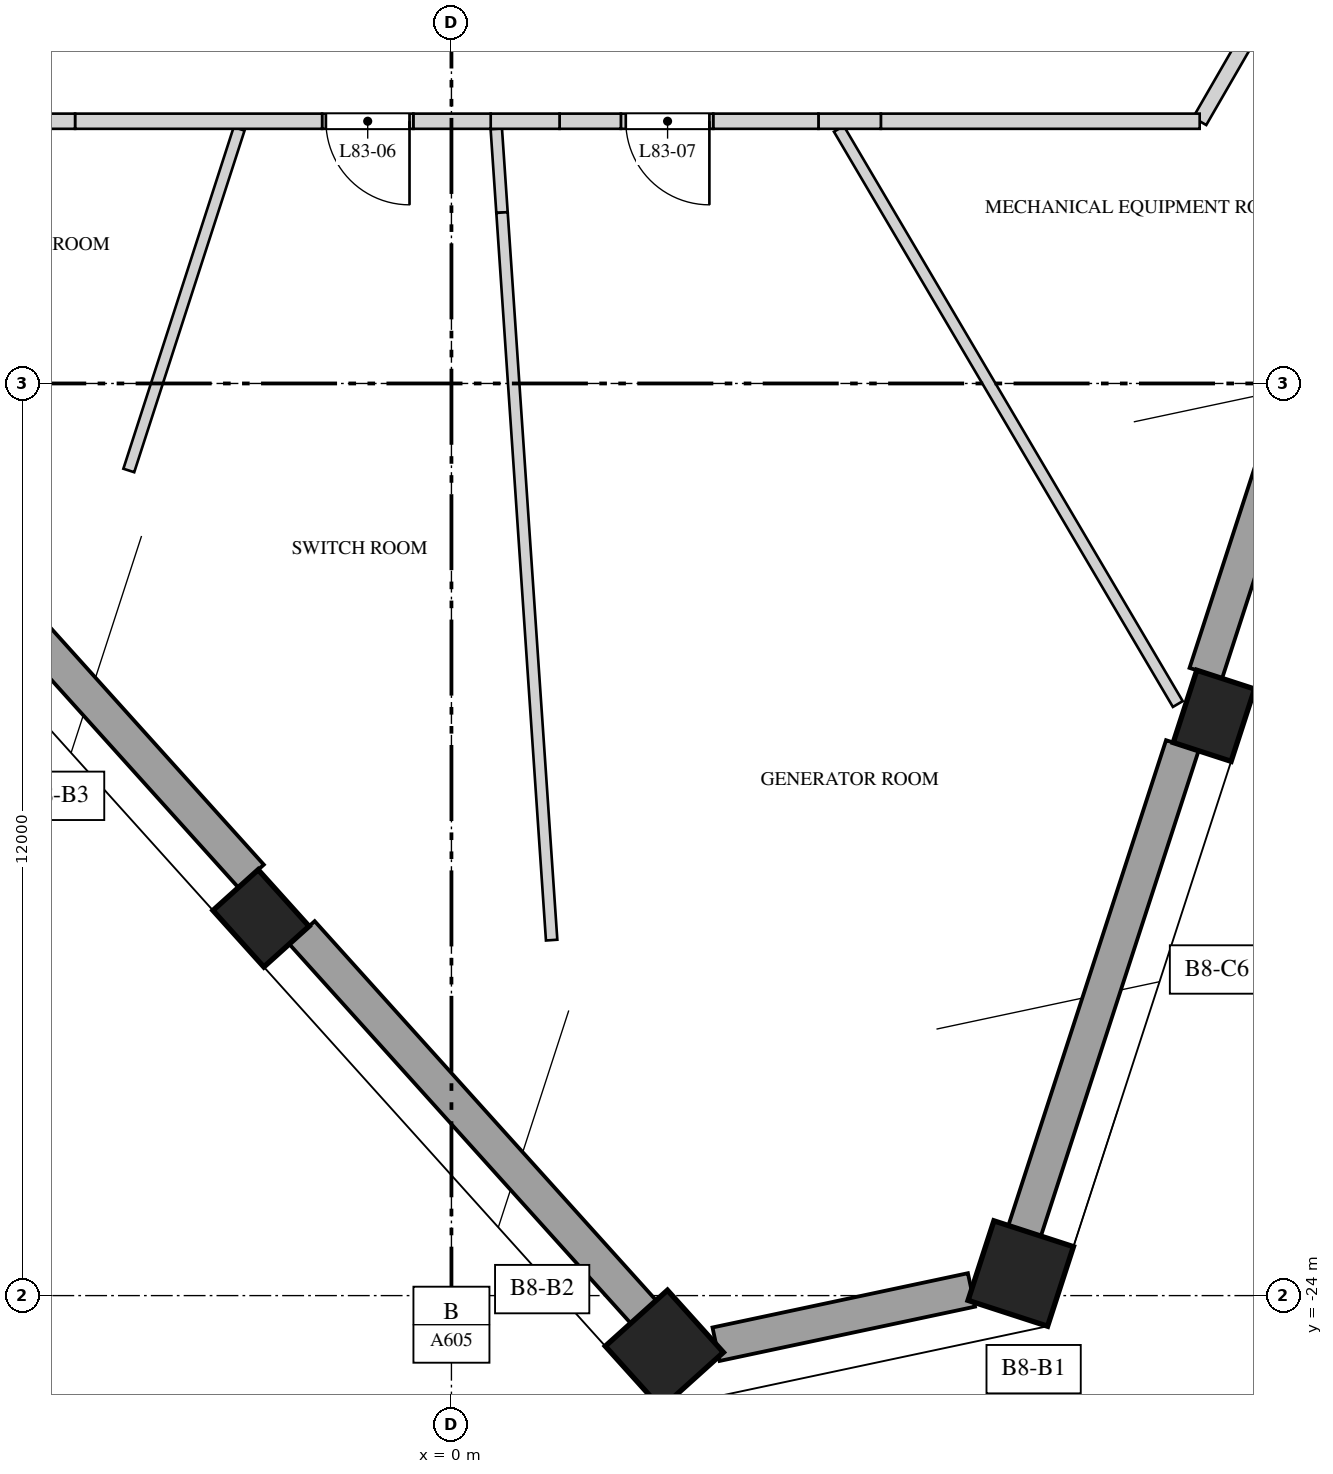
"""IFC4 building model, lengths in metres.
Left out: names, types, materials, properties, quantities, classifications, styles, units other than length and angle.
Written with IfcOpenShell. Run it as: python <this file> out.ifc"""

import sys

from ifc_helpers import new_model, si_unit, direction, frame, frame_2d, origin, origin_2d, place, context, subcontext, project, spatial, polyline, rectangle, outline, extrude, element, fill, save


model = new_model("IFC4")
c1 = context("Model", 3, precision=1e-05, world=origin(), true_north=direction((0.0, 1.0)))
c2 = subcontext(c1, "Body", "Model", "MODEL_VIEW")
j1 = project(units=[si_unit("LENGTHUNIT", "METRE"), si_unit("PLANEANGLEUNIT", "RADIAN")], contexts=[c1])
p1 = place(None, origin())
s1 = spatial("IfcSite", under=j1, at=p1, CompositionType="ELEMENT")
p2 = place(p1, origin())
s2 = spatial("IfcBuilding", under=s1, at=p2, CompositionType="ELEMENT")
p3 = place(p2, frame((0.0, 0.0, 361.4)))
s3 = spatial("IfcBuildingStorey", under=s2, at=p3, CompositionType="ELEMENT", Elevation=361.4)
p4 = place(p3, frame((-2.505, -19.037, 0.0), z_axis=(0.0, 0.0, 1.0), x_axis=(0.669130606359, -0.743144825477, 0.0)))
e1 = element("IfcColumn", 1, at=p4, inside=s3, PredefinedType="COLUMN", context=c2, shape_type="SweptSolid", body=[
    extrude(rectangle(XDim=1.0, YDim=0.8, at=origin_2d()), origin(), (0.0, 0.0, 1.0), 4.5),
])
for number, where, z_axis, x_axis in (
    (2, (2.801, -24.706, 0.0), (0.0, 0.0, 1.0), (0.669, -0.743, 0.0)),
    (3, (7.49, -23.709, 0.0), (0.0, 0.0, 1.0), (0.309, 0.951, 0.0)),
):
    element("IfcColumn", number, at=place(p3, frame(where, z_axis=z_axis, x_axis=x_axis)), inside=s3, PredefinedType="COLUMN", context=c2, shape_type="SweptSolid", body=[
        extrude(rectangle(XDim=1.1, YDim=1.1, at=origin_2d()), origin(), (0.0, 0.0, 1.0), 4.5),
    ])
p5 = place(p3, frame((10.032, -16.372, 0.0), z_axis=(0.0, 0.0, 1.0), x_axis=(0.309016994375, 0.951056516295, 0.0)))
e4 = element("IfcColumn", 4, at=p5, inside=s3, PredefinedType="COLUMN", context=c2, shape_type="SweptSolid", body=[
    extrude(rectangle(XDim=1.0, YDim=0.8, at=origin_2d()), origin(), (0.0, 0.0, 1.0), 4.5),
])
p6 = place(p3, frame((-7.53, -13.046, 0.0), z_axis=(0.0, 0.0, 1.0), x_axis=(0.669152823362, -0.743124820597, 0.0)))
e5 = element("IfcWall", 5, at=p6, inside=s3, PredefinedType="SOLIDWALL", context=c2, shape_type="SweptSolid", body=[
    extrude(rectangle(XDim=7.314, YDim=0.45, at=frame_2d((3.657, 0.0))), origin(), (0.0, 0.0, 1.0), 3.8),
])
p7 = place(p3, frame((-1.966, -19.224, 0.0), z_axis=(0.0, 0.0, 1.0), x_axis=(0.66911941145, -0.743154905266, 0.0)))
e6 = element("IfcWall", 6, at=p7, inside=s3, PredefinedType="SOLIDWALL", context=c2, shape_type="SweptSolid", body=[
    extrude(rectangle(XDim=6.714, YDim=0.45, at=frame_2d((3.357, 0.0))), origin(), (0.0, 0.0, 1.0), 3.8),
])
p8 = place(p3, frame((3.481, -24.64, 0.0), z_axis=(0.0, 0.0, 1.0), x_axis=(0.978139158523, 0.207951404333, 0.0)))
e7 = element("IfcWall", 7, at=p8, inside=s3, PredefinedType="SOLIDWALL", context=c2, shape_type="SweptSolid", body=[
    extrude(rectangle(XDim=3.435, YDim=0.45, at=frame_2d((1.718, 0.0))), origin(), (0.0, 0.0, 1.0), 3.8),
])
p9 = place(p3, frame((7.541, -23.148, 0.0), z_axis=(0.0, 0.0, 1.0), x_axis=(0.309018647645, 0.951055979114, 0.0)))
e8 = element("IfcWall", 8, at=p9, inside=s3, PredefinedType="SOLIDWALL", context=c2, shape_type="SweptSolid", body=[
    extrude(rectangle(XDim=6.714, YDim=0.45, at=frame_2d((3.357, 0.0))), origin(), (0.0, 0.0, 1.0), 3.8),
])
p10 = place(p3, frame((9.925, -15.812, 0.0), z_axis=(0.0, 0.0, 1.0), x_axis=(0.309008326872, 0.951059332494, 0.0)))
e9 = element("IfcWall", 9, at=p10, inside=s3, PredefinedType="SOLIDWALL", context=c2, shape_type="SweptSolid", body=[
    extrude(rectangle(XDim=7.314, YDim=0.45, at=frame_2d((3.657, 0.0))), origin(), (0.0, 0.0, 1.0), 3.8),
])
p11 = place(p3, frame((-2.793, -8.65, 0.0), z_axis=(0.0, 0.0, 1.0), x_axis=(-0.307297266893, -0.951613571656, 0.0)))
e10 = element("IfcWall", 10, at=p11, inside=s3, PredefinedType="PARTITIONING", context=c2, shape_type="SweptSolid", body=[
    extrude(rectangle(XDim=4.723, YDim=0.15, at=frame_2d((2.362, 0.0))), origin(), (0.0, 0.0, 1.0), 4.15),
])
p12 = place(p3, frame((0.59, -8.65, 0.0), z_axis=(0.0, 0.0, 1.0), x_axis=(0.068118949161, -0.997677206698, 0.0)))
e11 = element("IfcWall", 11, at=p12, inside=s3, PredefinedType="PARTITIONING", context=c2, shape_type="SweptSolid", body=[
    extrude(rectangle(XDim=1.104, YDim=0.15, at=frame_2d((0.552, 0.0))), origin(), (0.0, 0.0, 1.0), 3.05),
])
p13 = place(p3, frame((0.665, -9.751, 0.0), z_axis=(0.0, 0.0, 1.0), x_axis=(0.068072821069, -0.99768035514, 0.0)))
e12 = element("IfcWall", 12, at=p13, inside=s3, PredefinedType="PARTITIONING", context=c2, shape_type="SweptSolid", body=[
    extrude(rectangle(XDim=9.594, YDim=0.15, at=frame_2d((4.797, 0.0))), origin(), (0.0, 0.0, 1.0), 4.15),
])
p14 = place(p3, frame((5.097, -8.65, 0.0), z_axis=(0.0, 0.0, 1.0), x_axis=(0.507661360347, -0.861556697618, 0.0)))
e13 = element("IfcWall", 13, at=p14, inside=s3, PredefinedType="PARTITIONING", context=c2, shape_type="SweptSolid", body=[
    extrude(rectangle(XDim=8.783, YDim=0.15, at=frame_2d((4.392, 0.0))), origin(), (0.0, 0.0, 1.0), 3.45),
])
p15 = place(p3, frame((10.474, -7.458, 0.0), z_axis=(0.0, 0.0, 1.0), x_axis=(-0.499929168788, -0.866066294342, 0.0)))
e14 = element("IfcWall", 14, at=p15, inside=s3, PredefinedType="SOLIDWALL", context=c2, shape_type="SweptSolid", body=[
    extrude(rectangle(XDim=1.261, YDim=0.2, at=frame_2d((0.63, 0.0))), origin(), (0.0, 0.0, 1.0), 4.15),
])
p16 = place(p3, frame((9.844, -8.55, 0.0), z_axis=(0.0, 0.0, 1.0), x_axis=(-1.0, 0.0, 0.0)))
e15 = element("IfcWall", 15, at=p16, inside=s3, PredefinedType="SOLIDWALL", context=c2, shape_type="SweptSolid", body=[
    extrude(rectangle(XDim=4.194, YDim=0.2, at=frame_2d((2.097, 0.0))), origin(), (0.0, 0.0, 1.0), 4.15),
])
p17 = place(p3, frame((5.649, -8.55, 0.0), z_axis=(0.0, 0.0, 1.0), x_axis=(-1.0, 0.0, 0.0)))
e16 = element("IfcWall", 16, at=p17, inside=s3, PredefinedType="SOLIDWALL", context=c2, shape_type="SweptSolid", body=[
    extrude(rectangle(XDim=0.821, YDim=0.2, at=frame_2d((0.411, 0.0))), origin(), (0.0, 0.0, 1.0), 3.45),
])
p18 = place(p3, frame((4.828, -8.55, 0.0), z_axis=(0.0, 0.0, 1.0), x_axis=(-1.0, 0.0, 0.0)))
e17 = element("IfcWall", 17, at=p18, inside=s3, PredefinedType="SOLIDWALL", context=c2, shape_type="SweptSolid", body=[
    extrude(rectangle(XDim=1.385, YDim=0.2, at=frame_2d((0.692, 0.0))), origin(), (0.0, 0.0, 1.0), 4.15),
])
p19 = place(p3, frame((3.444, -8.55, 0.0), z_axis=(0.0, 0.0, 1.0), x_axis=(-1.0, 0.0, 0.0)))
e18 = element("IfcWall", 18, at=p19, inside=s3, PredefinedType="SOLIDWALL", context=c2, shape_type="SweptSolid", body=[
    extrude(outline(polyline([(0.0, 0.0), (1.215, 0.0), (1.215, 3.05), (0.271, 3.05), (0.271, 4.15), (0.0, 4.15), (0.0, 0.0)])), frame((0.0, 0.1, 0.0), z_axis=(0.0, -1.0, 0.0), x_axis=(1.0, 0.0, 0.0)), (0.0, 0.0, 1.0), 0.2),
])
p20 = place(p19, frame((0.05, 0.0, 0.0)))
e19 = element("IfcOpeningElement", 19, at=p20, cuts=e18, PredefinedType="OPENING", context=c2, shape_type="SweptSolid", body=[
    extrude(rectangle(XDim=1.1, YDim=2.4, at=frame_2d((0.55, 1.2))), frame((0.0, 0.11, 0.0), z_axis=(0.0, -1.0, 0.0), x_axis=(1.0, 0.0, 0.0)), (0.0, 0.0, 1.0), 0.22),
])
p21 = place(p3, frame((2.229, -8.55, 0.0), z_axis=(0.0, 0.0, 1.0), x_axis=(-1.0, 0.0, 0.0)))
e20 = element("IfcWall", 20, at=p21, inside=s3, PredefinedType="SOLIDWALL", context=c2, shape_type="SweptSolid", body=[
    extrude(rectangle(XDim=0.807, YDim=0.2, at=frame_2d((0.403, 0.0))), origin(), (0.0, 0.0, 1.0), 4.15),
])
p22 = place(p3, frame((1.422, -8.55, 0.0), z_axis=(0.0, 0.0, 1.0), x_axis=(-1.0, 0.0, 0.0)))
e21 = element("IfcWall", 21, at=p22, inside=s3, PredefinedType="SOLIDWALL", context=c2, shape_type="SweptSolid", body=[
    extrude(rectangle(XDim=0.906, YDim=0.2, at=frame_2d((0.453, 0.0))), origin(), (0.0, 0.0, 1.0), 3.05),
])
p23 = place(p3, frame((0.517, -8.55, 0.0), z_axis=(0.0, 0.0, 1.0), x_axis=(-1.0, 0.0, 0.0)))
e22 = element("IfcWall", 22, at=p23, inside=s3, PredefinedType="SOLIDWALL", context=c2, shape_type="SweptSolid", body=[
    extrude(rectangle(XDim=1.018, YDim=0.2, at=frame_2d((0.509, 0.0))), origin(), (0.0, 0.0, 1.0), 4.15),
])
p24 = place(p3, frame((-0.501, -8.55, 0.0), z_axis=(0.0, 0.0, 1.0), x_axis=(-1.0, 0.0, 0.0)))
e23 = element("IfcWall", 23, at=p24, inside=s3, PredefinedType="SOLIDWALL", context=c2, shape_type="SweptSolid", body=[
    extrude(outline(polyline([(0.0, 0.0), (1.2, 0.0), (1.2, 4.15), (1.027, 4.15), (1.027, 3.25), (0.22, 3.25), (0.22, 4.15), (0.0, 4.15), (0.0, 0.0)])), frame((0.0, 0.1, 0.0), z_axis=(0.0, -1.0, 0.0), x_axis=(1.0, 0.0, 0.0)), (0.0, 0.0, 1.0), 0.2),
])
p25 = place(p24, frame((0.05, 0.0, 0.0)))
e24 = element("IfcOpeningElement", 24, at=p25, cuts=e23, PredefinedType="OPENING", context=c2, shape_type="SweptSolid", body=[
    extrude(rectangle(XDim=1.1, YDim=2.4, at=frame_2d((0.55, 1.2))), frame((0.0, 0.11, 0.0), z_axis=(0.0, -1.0, 0.0), x_axis=(1.0, 0.0, 0.0)), (0.0, 0.0, 1.0), 0.22),
])
p26 = place(p3, frame((-1.701, -8.55, 0.0), z_axis=(0.0, 0.0, 1.0), x_axis=(-1.0, 0.0, 0.0)))
e25 = element("IfcWall", 25, at=p26, inside=s3, PredefinedType="SOLIDWALL", context=c2, shape_type="SweptSolid", body=[
    extrude(rectangle(XDim=3.25, YDim=0.2, at=frame_2d((1.625, 0.0))), origin(), (0.0, 0.0, 1.0), 4.15),
])
p27 = place(p3, frame((-6.838, -8.55, 0.0), z_axis=(0.0, 0.0, 1.0), x_axis=(1.0, 0.0, 0.0)))
e26 = element("IfcWall", 26, at=p27, inside=s3, PredefinedType="SOLIDWALL", context=c2, shape_type="SweptSolid", body=[
    extrude(outline(polyline([(0.0, 0.0), (1.886, 0.0), (1.886, 3.45), (1.06, 3.45), (1.06, 4.15), (0.0, 4.15), (0.0, 0.0)])), frame((0.0, 0.1, 0.0), z_axis=(0.0, -1.0, 0.0), x_axis=(1.0, 0.0, 0.0)), (0.0, 0.0, 1.0), 0.2),
])
p28 = place(p27, frame((0.05, 0.0, 0.0)))
e27 = element("IfcOpeningElement", 27, at=p28, cuts=e26, PredefinedType="OPENING", context=c2, shape_type="SweptSolid", body=[
    extrude(rectangle(XDim=1.1, YDim=2.4, at=frame_2d((0.55, 1.2))), frame((0.0, 0.11, 0.0), z_axis=(0.0, -1.0, 0.0), x_axis=(1.0, 0.0, 0.0)), (0.0, 0.0, 1.0), 0.22),
])
p29 = place(p25, origin())
e28 = element("IfcDoor", 28, at=p29, inside=s3, OperationType="SINGLE_SWING_LEFT", PredefinedType="DOOR", context=c2, shape_type="SweptSolid", body=[
    extrude(rectangle(XDim=1.1, YDim=2.4, at=frame_2d((0.55, 1.2))), frame((0.0, 0.025, 0.0), z_axis=(0.0, -1.0, 0.0), x_axis=(1.0, 0.0, 0.0)), (0.0, 0.0, 1.0), 0.05),
])
fill(e24, e28)
p30 = place(p20, origin())
e29 = element("IfcDoor", 29, at=p30, inside=s3, OperationType="SINGLE_SWING_RIGHT", PredefinedType="DOOR", context=c2, shape_type="SweptSolid", body=[
    extrude(rectangle(XDim=1.1, YDim=2.4, at=frame_2d((0.55, 1.2))), frame((0.0, 0.025, 0.0), z_axis=(0.0, -1.0, 0.0), x_axis=(1.0, 0.0, 0.0)), (0.0, 0.0, 1.0), 0.05),
])
fill(e19, e29)
save(model, sys.argv[1])
